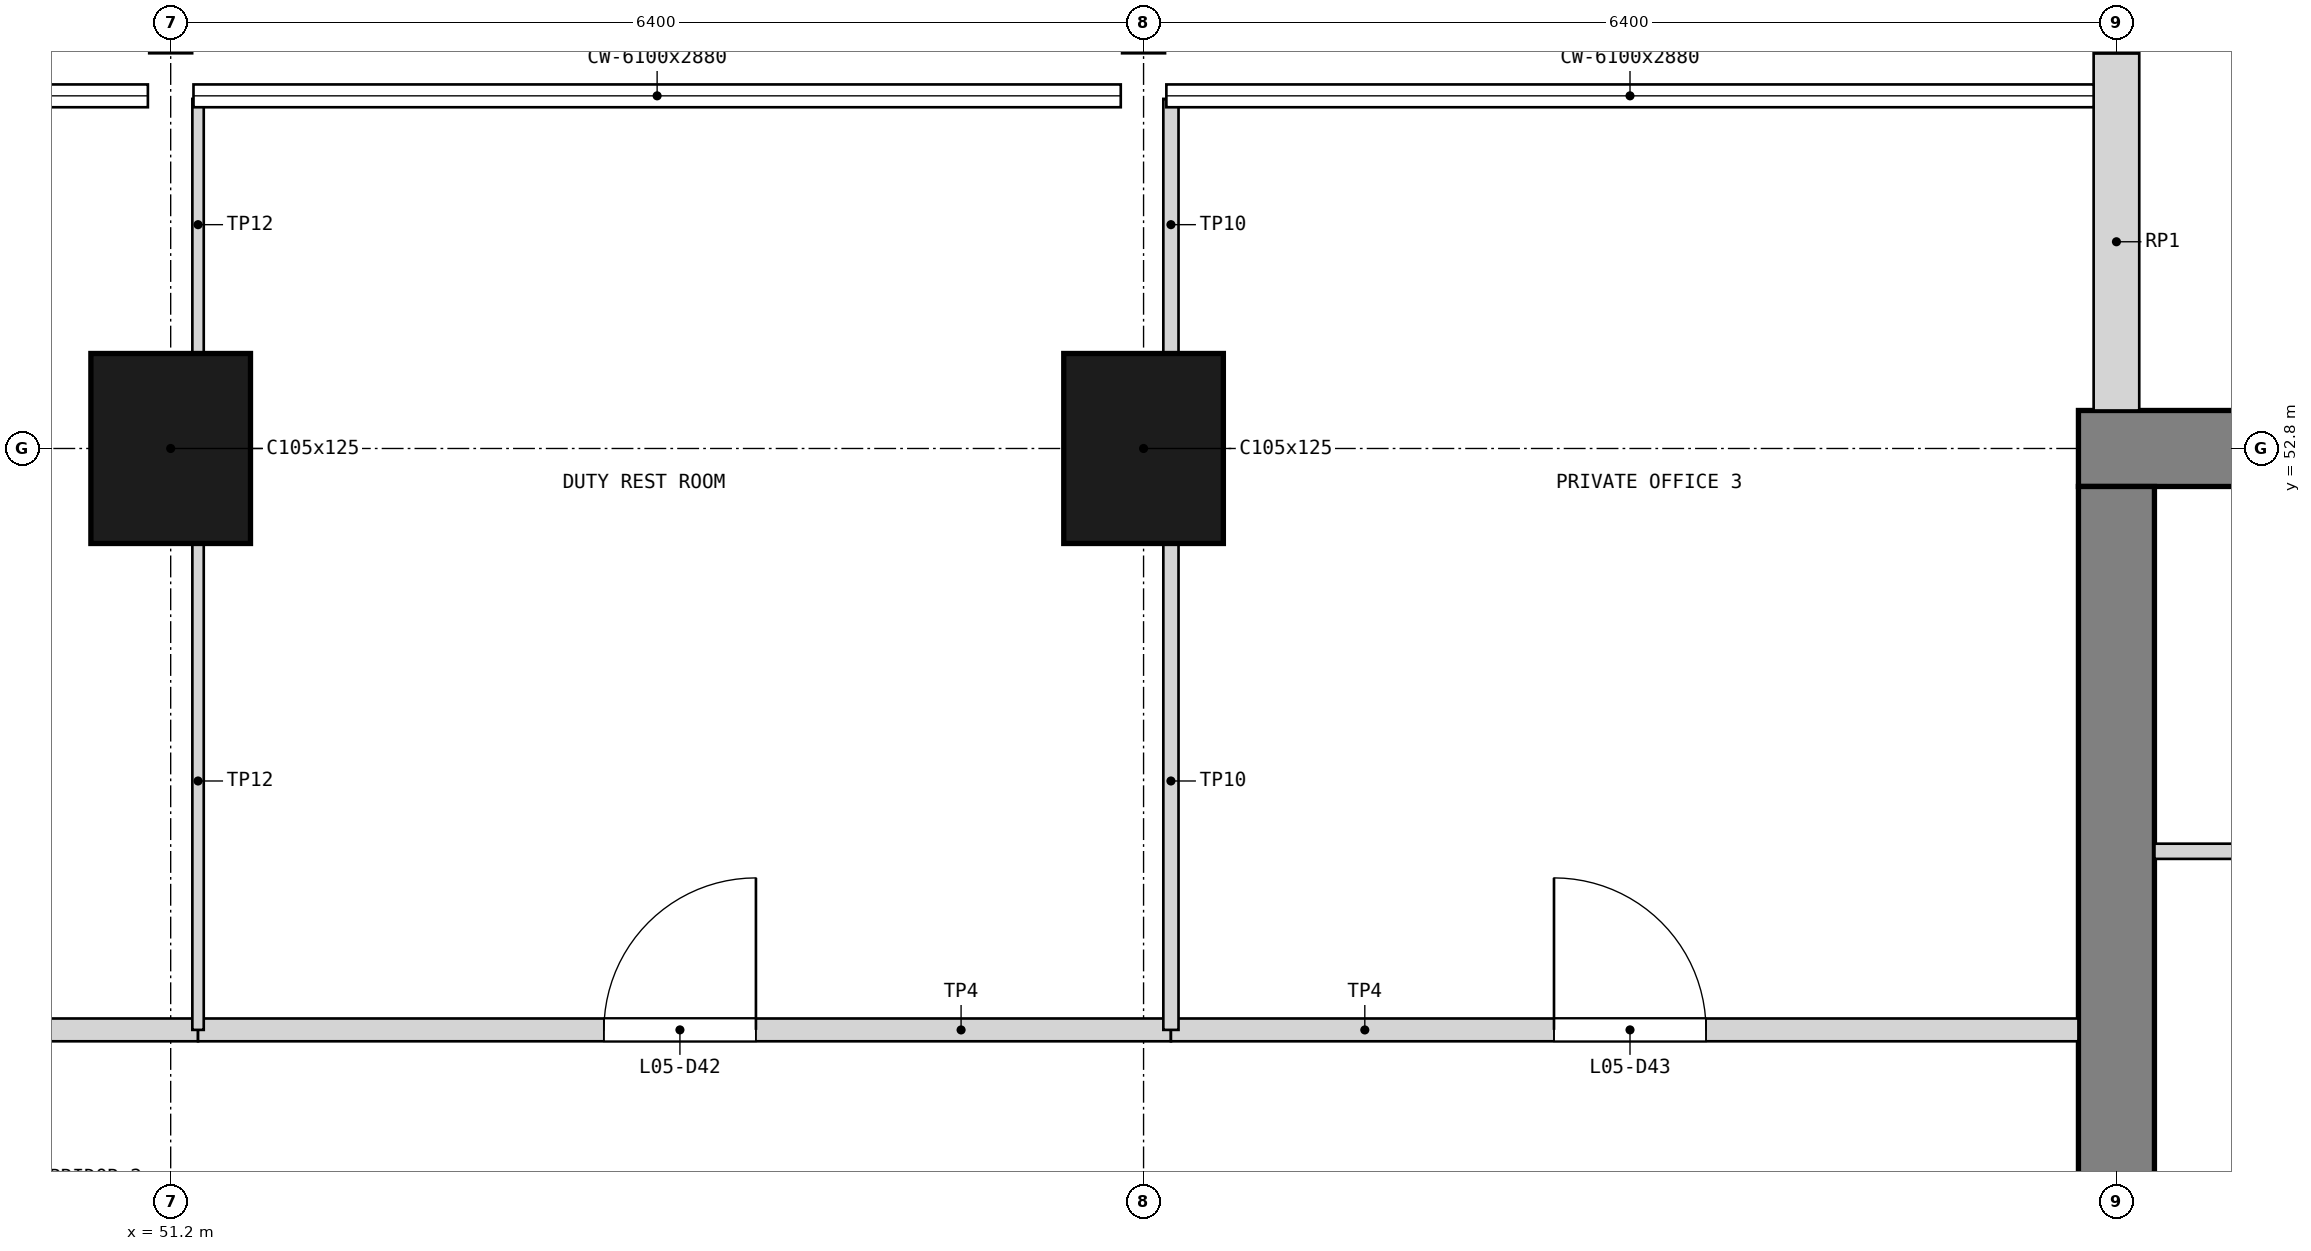
"""IFC4 building model, lengths in metres.
Left out: names, types, materials, properties, quantities, classifications, styles, units other than length and angle.
Written with IfcOpenShell. Run it as: python <this file> out.ifc"""

import sys

from ifc_helpers import new_model, si_unit, direction, frame, frame_2d, origin, origin_2d, place, context, subcontext, project, spatial, rectangle, extrude, element, fill, save


model = new_model("IFC4")
c1 = context("Model", 3, precision=1e-05, world=origin(), true_north=direction((0.0, 1.0)))
c2 = subcontext(c1, "Body", "Model", "MODEL_VIEW")
j1 = project(units=[si_unit("LENGTHUNIT", "METRE"), si_unit("PLANEANGLEUNIT", "RADIAN")], contexts=[c1])
p1 = place(None, origin())
s1 = spatial("IfcSite", under=j1, at=p1, CompositionType="ELEMENT")
p2 = place(p1, origin())
s2 = spatial("IfcBuilding", under=s1, at=p2, CompositionType="ELEMENT")
p3 = place(p2, frame((0.0, 0.0, 21.0)))
s3 = spatial("IfcBuildingStorey", under=s2, at=p3, CompositionType="ELEMENT", Elevation=21.0)
p4 = place(p3, frame((63.75, 52.8, 0.0), z_axis=(0.0, 0.0, 1.0), x_axis=(1.0, 0.0, 0.0)))
e1 = element("IfcWall", 1, at=p4, inside=s3, PredefinedType="SHEAR", context=c2, shape_type="SweptSolid", body=[
    extrude(rectangle(XDim=13.3, YDim=0.5, at=frame_2d((6.65, 0.0))), origin(), (0.0, 0.0, 1.0), 3.9),
])
p5 = place(p4, frame((11.05, 0.0, 1.0)))
e2 = element("IfcOpeningElement", 2, at=p5, cuts=e1, PredefinedType="OPENING", context=c2, shape_type="SweptSolid", body=[
    extrude(rectangle(XDim=0.4, YDim=2.0, at=frame_2d((0.2, 1.0))), frame((0.0, 0.26, 0.0), z_axis=(0.0, -1.0, 0.0), x_axis=(1.0, 0.0, 0.0)), (0.0, 0.0, 1.0), 0.52),
])
p6 = place(p3, frame((64.0, 33.85, 0.0), z_axis=(0.0, 0.0, 1.0), x_axis=(0.0, 1.0, 0.0)))
e3 = element("IfcWall", 3, at=p6, inside=s3, PredefinedType="SHEAR", context=c2, shape_type="SweptSolid", body=[
    extrude(rectangle(XDim=18.7, YDim=0.5, at=frame_2d((9.35, 0.0))), origin(), (0.0, 0.0, 1.0), 3.9),
])
p7 = place(p6, frame((8.35, 0.0, 0.0)))
e4 = element("IfcOpeningElement", 4, at=p7, cuts=e3, PredefinedType="OPENING", context=c2, shape_type="SweptSolid", body=[
    extrude(rectangle(XDim=2.0, YDim=2.1, at=frame_2d((1.0, 1.05))), frame((0.0, 0.26, 0.0), z_axis=(0.0, -1.0, 0.0), x_axis=(1.0, 0.0, 0.0)), (0.0, 0.0, 1.0), 0.52),
])
for number, where, z_axis, x_axis in (
    (5, (51.2, 52.8, 0.0), (0.0, 0.0, 1.0), (1.0, 0.0, 0.0)),
    (6, (57.6, 52.8, 0.0), (0.0, 0.0, 1.0), (1.0, 0.0, 0.0)),
):
    element("IfcColumn", number, at=place(p3, frame(where, z_axis=z_axis, x_axis=x_axis)), inside=s3, PredefinedType="COLUMN", context=c2, shape_type="SweptSolid", body=[
        extrude(rectangle(XDim=1.05, YDim=1.25, at=origin_2d()), origin(), (0.0, 0.0, 1.0), 3.9),
    ])
p8 = place(p3, frame((64.0, 53.05, 0.0), z_axis=(0.0, 0.0, 1.0), x_axis=(0.0, 1.0, 0.0)))
e7 = element("IfcWall", 7, at=p8, inside=s3, PredefinedType="SOLIDWALL", context=c2, shape_type="SweptSolid", body=[
    extrude(rectangle(XDim=2.35, YDim=0.3, at=frame_2d((1.175, 0.0))), origin(), (0.0, 0.0, 1.0), 2.88),
])
p9 = place(p3, frame((69.475, 50.15, 0.0), z_axis=(0.0, 0.0, 1.0), x_axis=(-1.0, 0.0, 0.0)))
e8 = element("IfcWall", 8, at=p9, inside=s3, PredefinedType="PARTITIONING", context=c2, shape_type="SweptSolid", body=[
    extrude(rectangle(XDim=5.225, YDim=0.1, at=frame_2d((2.613, 0.0))), origin(), (0.0, 0.0, 1.0), 3.6),
])
p10 = place(p3, frame((44.62, 48.975, 0.0), z_axis=(0.0, 0.0, 1.0), x_axis=(1.0, 0.0, 0.0)))
e9 = element("IfcWall", 9, at=p10, inside=s3, PredefinedType="PARTITIONING", context=c2, shape_type="SweptSolid", body=[
    extrude(rectangle(XDim=6.76, YDim=0.15, at=frame_2d((3.38, 0.0))), origin(), (0.0, 0.0, 1.0), 3.68),
])
p11 = place(p10, frame((2.88, 0.0, 0.0)))
e10 = element("IfcOpeningElement", 10, at=p11, cuts=e9, PredefinedType="OPENING", context=c2, shape_type="SweptSolid", body=[
    extrude(rectangle(XDim=1.0, YDim=2.1, at=frame_2d((0.5, 1.05))), frame((0.0, 0.085, 0.0), z_axis=(0.0, -1.0, 0.0), x_axis=(1.0, 0.0, 0.0)), (0.0, 0.0, 1.0), 0.17),
])
p12 = place(p3, frame((51.38, 48.975, 0.0), z_axis=(0.0, 0.0, 1.0), x_axis=(1.0, 0.0, 0.0)))
e11 = element("IfcWall", 11, at=p12, inside=s3, PredefinedType="PARTITIONING", context=c2, shape_type="SweptSolid", body=[
    extrude(rectangle(XDim=6.4, YDim=0.15, at=frame_2d((3.2, 0.0))), origin(), (0.0, 0.0, 1.0), 3.68),
])
p13 = place(p12, frame((2.67, 0.0, 0.0)))
e12 = element("IfcOpeningElement", 12, at=p13, cuts=e11, PredefinedType="OPENING", context=c2, shape_type="SweptSolid", body=[
    extrude(rectangle(XDim=1.0, YDim=2.1, at=frame_2d((0.5, 1.05))), frame((0.0, 0.085, 0.0), z_axis=(0.0, -1.0, 0.0), x_axis=(1.0, 0.0, 0.0)), (0.0, 0.0, 1.0), 0.17),
])
p14 = place(p3, frame((57.78, 48.975, 0.0), z_axis=(0.0, 0.0, 1.0), x_axis=(1.0, 0.0, 0.0)))
e13 = element("IfcWall", 13, at=p14, inside=s3, PredefinedType="PARTITIONING", context=c2, shape_type="SweptSolid", body=[
    extrude(rectangle(XDim=5.97, YDim=0.15, at=frame_2d((2.985, 0.0))), origin(), (0.0, 0.0, 1.0), 3.68),
])
p15 = place(p14, frame((2.52, 0.0, 0.0)))
e14 = element("IfcOpeningElement", 14, at=p15, cuts=e13, PredefinedType="OPENING", context=c2, shape_type="SweptSolid", body=[
    extrude(rectangle(XDim=1.0, YDim=2.1, at=frame_2d((0.5, 1.05))), frame((0.0, 0.085, 0.0), z_axis=(0.0, -1.0, 0.0), x_axis=(1.0, 0.0, 0.0)), (0.0, 0.0, 1.0), 0.17),
])
p16 = place(p3, frame((51.38, 48.975, 0.0), z_axis=(0.0, 0.0, 1.0), x_axis=(0.0, 1.0, 0.0)))
e15 = element("IfcWall", 15, at=p16, inside=s3, PredefinedType="PARTITIONING", context=c2, shape_type="SweptSolid", body=[
    extrude(rectangle(XDim=3.22, YDim=0.075, at=frame_2d((1.61, 0.0))), origin(), (0.0, 0.0, 1.0), 2.78),
])
p17 = place(p3, frame((51.38, 53.405, 0.0), z_axis=(0.0, 0.0, 1.0), x_axis=(0.0, 1.0, 0.0)))
e16 = element("IfcWall", 16, at=p17, inside=s3, PredefinedType="PARTITIONING", context=c2, shape_type="SweptSolid", body=[
    extrude(rectangle(XDim=1.695, YDim=0.075, at=frame_2d((0.848, 0.0))), origin(), (0.0, 0.0, 1.0), 2.78),
])
p18 = place(p3, frame((57.78, 48.975, 0.0), z_axis=(0.0, 0.0, 1.0), x_axis=(0.0, 1.0, 0.0)))
e17 = element("IfcWall", 17, at=p18, inside=s3, PredefinedType="PARTITIONING", context=c2, shape_type="SweptSolid", body=[
    extrude(rectangle(XDim=3.22, YDim=0.1, at=frame_2d((1.61, 0.0))), origin(), (0.0, 0.0, 1.0), 2.78),
])
p19 = place(p3, frame((57.78, 53.405, 0.0), z_axis=(0.0, 0.0, 1.0), x_axis=(0.0, 1.0, 0.0)))
e18 = element("IfcWall", 18, at=p19, inside=s3, PredefinedType="PARTITIONING", context=c2, shape_type="SweptSolid", body=[
    extrude(rectangle(XDim=1.695, YDim=0.1, at=frame_2d((0.848, 0.0))), origin(), (0.0, 0.0, 1.0), 2.78),
])
p20 = place(p13, origin())
e19 = element("IfcDoor", 19, at=p20, inside=s3, OperationType="SINGLE_SWING_RIGHT", PredefinedType="DOOR", context=c2, shape_type="SweptSolid", body=[
    extrude(rectangle(XDim=1.0, YDim=2.1, at=frame_2d((0.5, 1.05))), frame((0.0, 0.025, 0.0), z_axis=(0.0, -1.0, 0.0), x_axis=(1.0, 0.0, 0.0)), (0.0, 0.0, 1.0), 0.05),
])
fill(e12, e19)
p21 = place(p15, origin())
e20 = element("IfcDoor", 20, at=p21, inside=s3, OperationType="SINGLE_SWING_LEFT", PredefinedType="DOOR", context=c2, shape_type="SweptSolid", body=[
    extrude(rectangle(XDim=1.0, YDim=2.1, at=frame_2d((0.5, 1.05))), frame((0.0, 0.025, 0.0), z_axis=(0.0, -1.0, 0.0), x_axis=(1.0, 0.0, 0.0)), (0.0, 0.0, 1.0), 0.05),
])
fill(e14, e20)
save(model, sys.argv[1])
